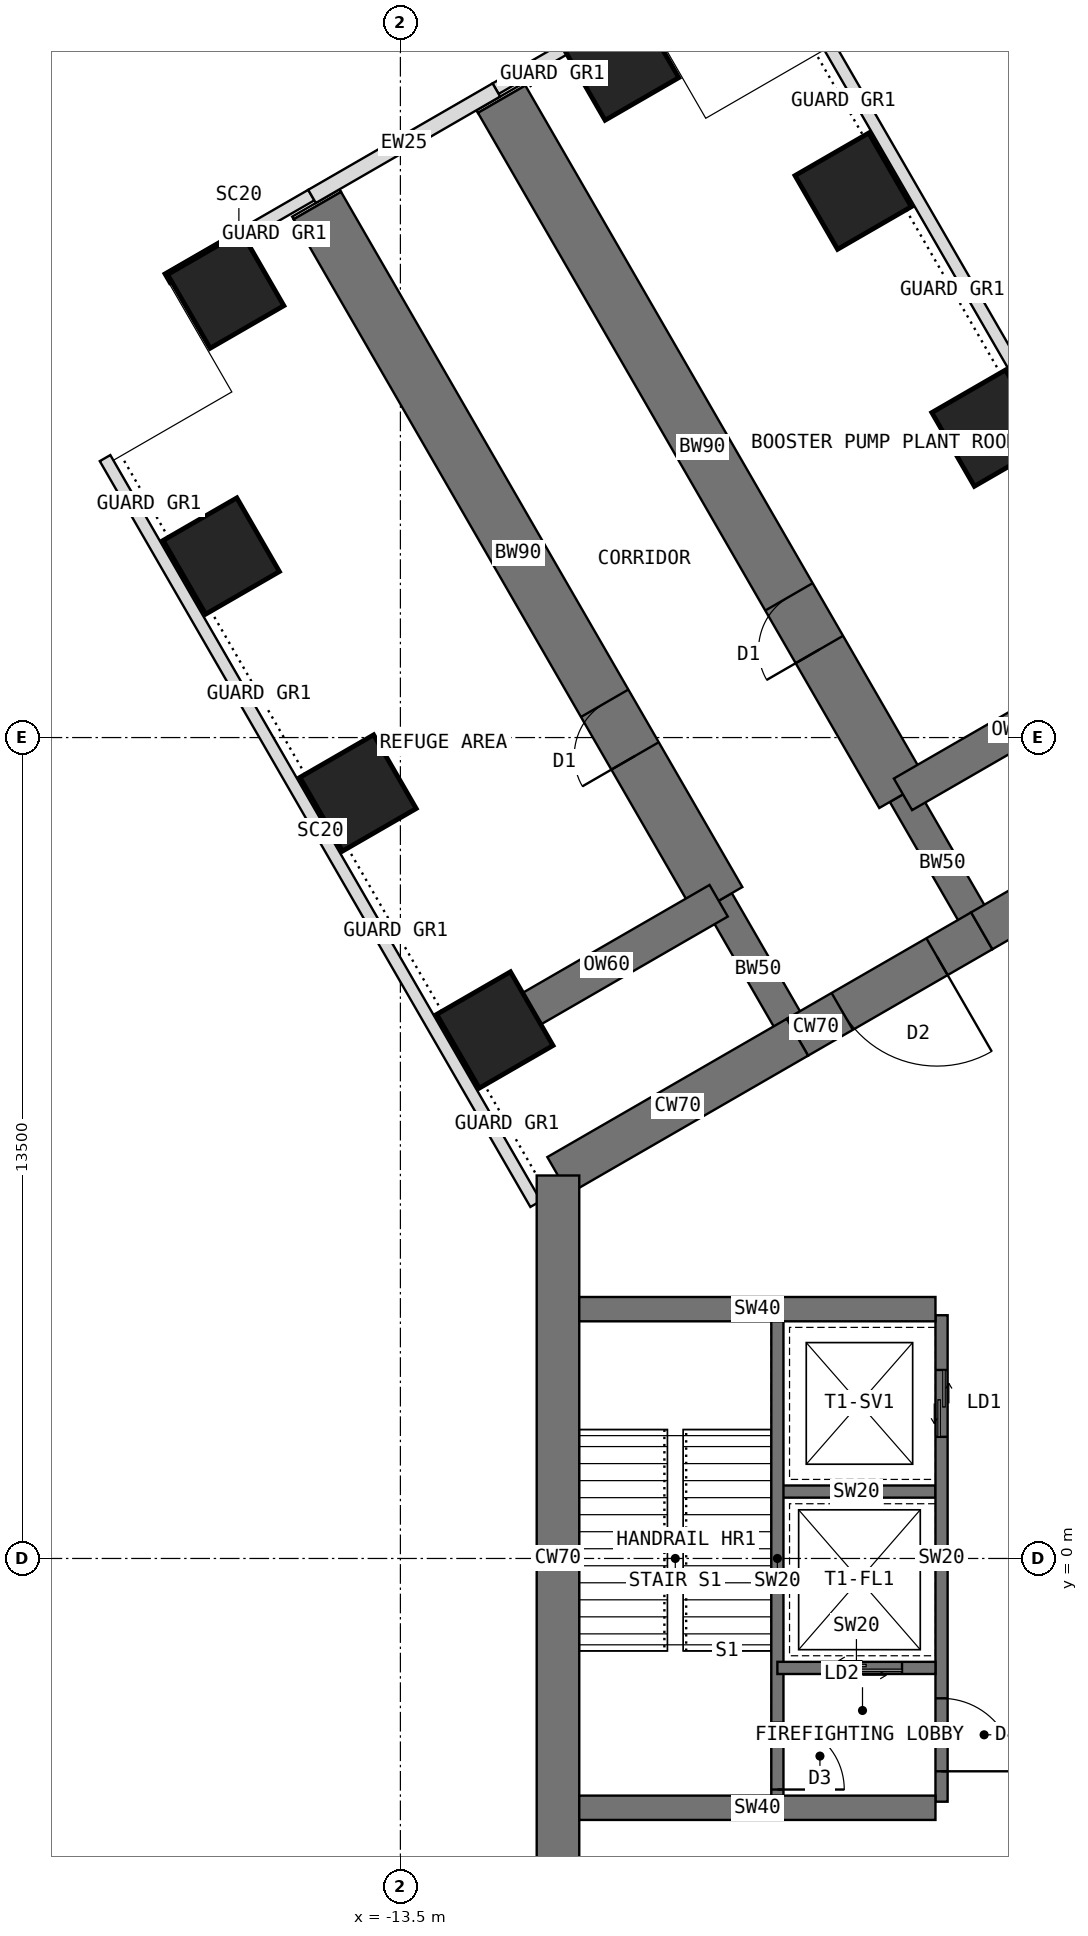
"""IFC4 building model, lengths in metres.
Left out: names, types, materials, properties, quantities, classifications, styles, units other than length and angle.
Written with IfcOpenShell. Run it as: python <this file> out.ifc"""

import sys

from ifc_helpers import new_model, si_unit, direction, frame, frame_2d, origin, origin_2d, place, context, subcontext, project, spatial, rectangle, extrude, element, fill, save


model = new_model("IFC4")
c1 = context("Model", 3, precision=1e-05, world=origin(), true_north=direction((0.0, 1.0)))
c2 = subcontext(c1, "Body", "Model", "MODEL_VIEW")
j1 = project(units=[si_unit("LENGTHUNIT", "METRE"), si_unit("PLANEANGLEUNIT", "RADIAN")], contexts=[c1])
p1 = place(None, origin())
s1 = spatial("IfcSite", under=j1, at=p1, CompositionType="ELEMENT")
p2 = place(p1, origin())
s2 = spatial("IfcBuilding", under=s1, at=p2, CompositionType="ELEMENT")
p3 = place(p2, frame((0.0, 0.0, 92.5)))
s3 = spatial("IfcBuildingStorey", under=s2, at=p3, CompositionType="ELEMENT", Elevation=92.5)
p4 = place(p3, frame((0.0, 12.596, 0.0), z_axis=(0.0, 0.0, 1.0), x_axis=(-0.866011268655, -0.500024481964, 0.0)))
e1 = element("IfcWall", 1, at=p4, inside=s3, PredefinedType="SHEAR", context=c2, shape_type="SweptSolid", body=[
    extrude(rectangle(XDim=4.548, YDim=0.7, at=frame_2d((2.274, 0.0))), origin(), (0.0, 0.0, 1.0), 5.0),
])
p5 = place(p3, frame((-3.939, 10.322, 0.0), z_axis=(0.0, 0.0, 1.0), x_axis=(-0.866019471182, -0.500010275428, 0.0)))
e2 = element("IfcWall", 2, at=p5, inside=s3, PredefinedType="SHEAR", context=c2, shape_type="SweptSolid", body=[
    extrude(rectangle(XDim=3.5, YDim=0.7, at=frame_2d((1.75, 0.0))), origin(), (0.0, 0.0, 1.0), 5.0),
])
p6 = place(p5, frame((0.85, 0.0, 0.0)))
e3 = element("IfcOpeningElement", 3, at=p6, cuts=e2, PredefinedType="OPENING", context=c2, shape_type="SweptSolid", body=[
    extrude(rectangle(XDim=1.8, YDim=2.1, at=frame_2d((0.9, 1.05))), frame((0.0, 0.36, 0.0), z_axis=(0.0, -1.0, 0.0), x_axis=(1.0, 0.0, 0.0)), (0.0, 0.0, 1.0), 0.72),
])
p7 = place(p3, frame((-6.97, 8.572, 0.0), z_axis=(0.0, 0.0, 1.0), x_axis=(-0.866034513004, -0.499984222037, 0.0)))
e4 = element("IfcWall", 4, at=p7, inside=s3, PredefinedType="SHEAR", context=c2, shape_type="SweptSolid", body=[
    extrude(rectangle(XDim=4.548, YDim=0.7, at=frame_2d((2.274, 0.0))), origin(), (0.0, 0.0, 1.0), 5.0),
])
p8 = place(p3, frame((-10.908, 6.298, 0.0), z_axis=(0.0, 0.0, 1.0), x_axis=(0.0, -1.0, 0.0)))
e5 = element("IfcWall", 5, at=p8, inside=s3, PredefinedType="SHEAR", context=c2, shape_type="SweptSolid", body=[
    extrude(rectangle(XDim=12.596, YDim=0.7, at=frame_2d((6.298, 0.0))), origin(), (0.0, 0.0, 1.0), 5.0),
])
p9 = place(p3, frame((-6.97, 8.572, 0.0), z_axis=(0.0, 0.0, 1.0), x_axis=(-0.499988811324, 0.866031863473, 0.0)))
e6 = element("IfcWall", 6, at=p9, inside=s3, PredefinedType="SHEAR", context=c2, shape_type="SweptSolid", body=[
    extrude(rectangle(XDim=2.592, YDim=0.5, at=frame_2d((1.296, 0.0))), origin(), (0.0, 0.0, 1.0), 5.0),
])
p10 = place(p3, frame((-8.266, 10.816, 0.0), z_axis=(0.0, 0.0, 1.0), x_axis=(-0.499996231654, 0.866027579429, 0.0)))
e7 = element("IfcWall", 7, at=p10, inside=s3, PredefinedType="SHEAR", context=c2, shape_type="SweptSolid", body=[
    extrude(rectangle(XDim=13.2, YDim=0.9, at=frame_2d((6.6, 0.0))), origin(), (0.0, 0.0, 1.0), 5.0),
])
p11 = place(p10, frame((2.75, 0.0, 0.0)))
e8 = element("IfcOpeningElement", 8, at=p11, cuts=e7, PredefinedType="OPENING", context=c2, shape_type="SweptSolid", body=[
    extrude(rectangle(XDim=1.0, YDim=2.1, at=frame_2d((0.5, 1.05))), frame((0.0, 0.46, 0.0), z_axis=(0.0, -1.0, 0.0), x_axis=(1.0, 0.0, 0.0)), (0.0, 0.0, 1.0), 0.92),
])
p12 = place(p3, frame((-3.939, 10.322, 0.0), z_axis=(0.0, 0.0, 1.0), x_axis=(-0.499918158782, 0.866072649678, 0.0)))
e9 = element("IfcWall", 9, at=p12, inside=s3, PredefinedType="SHEAR", context=c2, shape_type="SweptSolid", body=[
    extrude(rectangle(XDim=2.592, YDim=0.5, at=frame_2d((1.296, 0.0))), origin(), (0.0, 0.0, 1.0), 5.0),
])
p13 = place(p3, frame((-5.234, 12.566, 0.0), z_axis=(0.0, 0.0, 1.0), x_axis=(-0.500010103361, 0.866019570528, 0.0)))
e10 = element("IfcWall", 10, at=p13, inside=s3, PredefinedType="SHEAR", context=c2, shape_type="SweptSolid", body=[
    extrude(rectangle(XDim=13.2, YDim=0.9, at=frame_2d((6.6, 0.0))), origin(), (0.0, 0.0, 1.0), 5.0),
])
p14 = place(p13, frame((2.75, 0.0, 0.0)))
e11 = element("IfcOpeningElement", 11, at=p14, cuts=e10, PredefinedType="OPENING", context=c2, shape_type="SweptSolid", body=[
    extrude(rectangle(XDim=1.0, YDim=2.1, at=frame_2d((0.5, 1.05))), frame((0.0, 0.46, 0.0), z_axis=(0.0, -1.0, 0.0), x_axis=(1.0, 0.0, 0.0)), (0.0, 0.0, 1.0), 0.92),
])
for number, where, z_axis, x_axis in (
    (12, (-11.946, 8.691, 0.0), (0.0, 0.0, 1.0), (0.866, 0.5, 0.0)),
    (13, (-14.196, 12.588, 0.0), (0.0, 0.0, 1.0), (0.866, 0.5, 0.0)),
    (14, (-3.804, 18.588, 0.0), (0.0, 0.0, 1.0), (0.866, 0.5, 0.0)),
    (15, (-16.446, 16.486, 0.0), (0.0, 0.0, 1.0), (0.866, 0.5, 0.0)),
    (16, (-6.054, 22.486, 0.0), (0.0, 0.0, 1.0), (0.866, 0.5, 0.0)),
    (17, (-16.373, 20.858, 0.0), (0.0, 0.0, 1.0), (0.866, 0.5, 0.0)),
    (18, (-9.877, 24.608, 0.0), (0.0, 0.0, 1.0), (0.866, 0.5, 0.0)),
):
    element("IfcColumn", number, at=place(p3, frame(where, z_axis=z_axis, x_axis=x_axis)), inside=s3, PredefinedType="COLUMN", context=c2, shape_type="SweptSolid", body=[
        extrude(rectangle(XDim=1.4, YDim=1.4, at=origin_2d()), origin(), (0.0, 0.0, 1.0), 5.0),
    ])
for number, where, z_axis, x_axis in (
    (19, (-8.266, 10.816, 0.0), (0.0, 0.0, 1.0), (-0.866, -0.5, 0.0)),
    (20, (-5.234, 12.566, 0.0), (0.0, 0.0, 1.0), (0.866, 0.5, 0.0)),
):
    element("IfcWall", number, at=place(p3, frame(where, z_axis=z_axis, x_axis=x_axis)), inside=s3, PredefinedType="SHEAR", context=c2, shape_type="SweptSolid", body=[
        extrude(rectangle(XDim=4.25, YDim=0.6, at=frame_2d((2.125, 0.0))), origin(), (0.0, 0.0, 1.0), 5.0),
    ])
for number, where, z_axis, x_axis in (
    (21, (-11.276, 5.83, 0.0), (0.0, 0.0, 1.0), (-0.5, 0.866, 0.0)),
    (22, (-6.493, 24.946, 0.0), (0.0, 0.0, 1.0), (0.5, -0.866, 0.0)),
):
    element("IfcWall", number, at=place(p3, frame(where, z_axis=z_axis, x_axis=x_axis)), inside=s3, PredefinedType="USERDEFINED", context=c2, shape_type="SweptSolid", body=[
        extrude(rectangle(XDim=14.163, YDim=0.2, at=frame_2d((7.082, 0.0))), origin(), (0.0, 0.0, 1.0), 4.8),
    ])
p15 = place(p3, frame((-9.553, 25.546, 0.0), z_axis=(0.0, 0.0, 1.0), x_axis=(-0.866027397988, -0.499996545922, 0.0)))
e23 = element("IfcWall", 23, at=p15, inside=s3, PredefinedType="USERDEFINED", context=c2, shape_type="SweptSolid", body=[
    extrude(rectangle(XDim=2.75, YDim=0.2, at=frame_2d((1.375, 0.0))), origin(), (0.0, 0.0, 1.0), 4.8),
])
p16 = place(p3, frame((-11.922, 24.149, 0.0), z_axis=(0.0, 0.0, 1.0), x_axis=(-0.866036909293, -0.499980071345, 0.0)))
e24 = element("IfcWall", 24, at=p16, inside=s3, PredefinedType="STANDARD", context=c2, shape_type="SweptSolid", body=[
    extrude(rectangle(XDim=3.5, YDim=0.25, at=frame_2d((1.75, 0.0))), origin(), (0.0, 0.0, 1.0), 4.8),
])
p17 = place(p3, frame((-14.966, 22.421, 0.0), z_axis=(0.0, 0.0, 1.0), x_axis=(-0.866027397988, -0.499996545922, 0.0)))
e25 = element("IfcWall", 25, at=p17, inside=s3, PredefinedType="USERDEFINED", context=c2, shape_type="SweptSolid", body=[
    extrude(rectangle(XDim=2.75, YDim=0.2, at=frame_2d((1.375, 0.0))), origin(), (0.0, 0.0, 1.0), 4.8),
])
p18 = place(p3, frame((-14.865, 22.248, 0.0), z_axis=(0.0, 0.0, 1.0), x_axis=(-0.500844580232, 0.86553723574, 0.0)))
e26 = element("IfcWall", 26, at=p18, inside=s3, PredefinedType="PARTITIONING", context=c2, shape_type="SweptSolid", body=[
    extrude(rectangle(XDim=0.05, YDim=0.9, at=frame_2d((0.025, 0.0))), origin(), (0.0, 0.0, 1.0), 4.8),
])
p19 = place(p3, frame((-11.834, 23.998, 0.0), z_axis=(0.0, 0.0, 1.0), x_axis=(-0.497188445666, 0.867642581652, 0.0)))
e27 = element("IfcWall", 27, at=p19, inside=s3, PredefinedType="PARTITIONING", context=c2, shape_type="SweptSolid", body=[
    extrude(rectangle(XDim=0.05, YDim=0.9, at=frame_2d((0.025, 0.0))), origin(), (0.0, 0.0, 1.0), 4.8),
])
p20 = place(p3, frame((-4.6, 4.0, 0.0), z_axis=(0.0, 0.0, 1.0), x_axis=(0.0, -1.0, 0.0)))
e28 = element("IfcWall", 28, at=p20, inside=s3, PredefinedType="SHEAR", context=c2, shape_type="SweptSolid", body=[
    extrude(rectangle(XDim=8.0, YDim=0.2, at=frame_2d((4.0, 0.0))), origin(), (0.0, 0.0, 1.0), 5.0),
])
p21 = place(p20, frame((6.3, 0.0, 0.0)))
e29 = element("IfcOpeningElement", 29, at=p21, cuts=e28, PredefinedType="OPENING", context=c2, shape_type="SweptSolid", body=[
    extrude(rectangle(XDim=1.2, YDim=2.1, at=frame_2d((0.6, 1.05))), frame((0.0, 0.11, 0.0), z_axis=(0.0, -1.0, 0.0), x_axis=(1.0, 0.0, 0.0)), (0.0, 0.0, 1.0), 0.22),
])
p22 = place(p20, frame((0.9, 0.0, 0.0)))
e30 = element("IfcOpeningElement", 30, at=p22, cuts=e28, PredefinedType="OPENING", context=c2, shape_type="SweptSolid", body=[
    extrude(rectangle(XDim=1.1, YDim=2.2, at=frame_2d((0.55, 1.1))), frame((0.0, 0.11, 0.0), z_axis=(0.0, -1.0, 0.0), x_axis=(1.0, 0.0, 0.0)), (0.0, 0.0, 1.0), 0.22),
])
p23 = place(p3, frame((-4.7, 1.1, 0.0), z_axis=(0.0, 0.0, 1.0), x_axis=(-1.0, 0.0, 0.0)))
e31 = element("IfcWall", 31, at=p23, inside=s3, PredefinedType="SHEAR", context=c2, shape_type="SweptSolid", body=[
    extrude(rectangle(XDim=2.6, YDim=0.2, at=frame_2d((1.3, 0.0))), origin(), (0.0, 0.0, 1.0), 5.0),
])
p24 = place(p3, frame((-4.7, -1.8, 0.0), z_axis=(0.0, 0.0, 1.0), x_axis=(-1.0, 0.0, 0.0)))
e32 = element("IfcWall", 32, at=p24, inside=s3, PredefinedType="SHEAR", context=c2, shape_type="SweptSolid", body=[
    extrude(rectangle(XDim=2.6, YDim=0.2, at=frame_2d((1.3, 0.0))), origin(), (0.0, 0.0, 1.0), 5.0),
])
p25 = place(p24, frame((0.55, 0.0, 0.0)))
e33 = element("IfcOpeningElement", 33, at=p25, cuts=e32, PredefinedType="OPENING", context=c2, shape_type="SweptSolid", body=[
    extrude(rectangle(XDim=1.3, YDim=2.2, at=frame_2d((0.65, 1.1))), frame((0.0, 0.11, 0.0), z_axis=(0.0, -1.0, 0.0), x_axis=(1.0, 0.0, 0.0)), (0.0, 0.0, 1.0), 0.22),
])
p26 = place(p3, frame((-7.3, 4.0, 0.0), z_axis=(0.0, 0.0, 1.0), x_axis=(0.0, -1.0, 0.0)))
e34 = element("IfcWall", 34, at=p26, inside=s3, PredefinedType="SHEAR", context=c2, shape_type="SweptSolid", body=[
    extrude(rectangle(XDim=8.0, YDim=0.2, at=frame_2d((4.0, 0.0))), origin(), (0.0, 0.0, 1.0), 5.0),
])
p27 = place(p26, frame((6.7, 0.0, 0.0)))
e35 = element("IfcOpeningElement", 35, at=p27, cuts=e34, PredefinedType="OPENING", context=c2, shape_type="SweptSolid", body=[
    extrude(rectangle(XDim=1.1, YDim=2.1, at=frame_2d((0.55, 1.05))), frame((0.0, 0.11, 0.0), z_axis=(0.0, -1.0, 0.0), x_axis=(1.0, 0.0, 0.0)), (0.0, 0.0, 1.0), 0.22),
])
for number, where, z_axis, x_axis in (
    (36, (-4.7, -4.1, 0.0), (0.0, 0.0, 1.0), (-1.0, 0.0, 0.0)),
    (37, (-4.7, 4.1, 0.0), (0.0, 0.0, 1.0), (-1.0, 0.0, 0.0)),
):
    element("IfcWall", number, at=place(p3, frame(where, z_axis=z_axis, x_axis=x_axis)), inside=s3, PredefinedType="SHEAR", context=c2, shape_type="SweptSolid", body=[
        extrude(rectangle(XDim=5.858, YDim=0.4, at=frame_2d((2.929, 0.0))), origin(), (0.0, 0.0, 1.0), 5.0),
    ])
p28 = place(p21, origin())
e38 = element("IfcDoor", 38, at=p28, inside=s3, OperationType="SINGLE_SWING_RIGHT", PredefinedType="DOOR", context=c2, shape_type="SweptSolid", body=[
    extrude(rectangle(XDim=1.2, YDim=2.1, at=frame_2d((0.6, 1.05))), frame((0.0, 0.025, 0.0), z_axis=(0.0, -1.0, 0.0), x_axis=(1.0, 0.0, 0.0)), (0.0, 0.0, 1.0), 0.05),
])
fill(e29, e38)
p29 = place(p25, origin())
e39 = element("IfcDoor", 39, at=p29, inside=s3, OperationType="DOUBLE_DOOR_SLIDING", PredefinedType="DOOR", context=c2, shape_type="SweptSolid", body=[
    extrude(rectangle(XDim=1.3, YDim=2.2, at=frame_2d((0.65, 1.1))), frame((0.0, 0.025, 0.0), z_axis=(0.0, -1.0, 0.0), x_axis=(1.0, 0.0, 0.0)), (0.0, 0.0, 1.0), 0.05),
])
fill(e33, e39)
p30 = place(p22, origin())
e40 = element("IfcDoor", 40, at=p30, inside=s3, OperationType="DOUBLE_DOOR_SLIDING", PredefinedType="DOOR", context=c2, shape_type="SweptSolid", body=[
    extrude(rectangle(XDim=1.1, YDim=2.2, at=frame_2d((0.55, 1.1))), frame((0.0, 0.025, 0.0), z_axis=(0.0, -1.0, 0.0), x_axis=(1.0, 0.0, 0.0)), (0.0, 0.0, 1.0), 0.05),
])
fill(e30, e40)
p31 = place(p27, origin())
e41 = element("IfcDoor", 41, at=p31, inside=s3, OperationType="SINGLE_SWING_RIGHT", PredefinedType="DOOR", context=c2, shape_type="SweptSolid", body=[
    extrude(rectangle(XDim=1.1, YDim=2.1, at=frame_2d((0.55, 1.05))), frame((0.0, 0.025, 0.0), z_axis=(0.0, -1.0, 0.0), x_axis=(1.0, 0.0, 0.0)), (0.0, 0.0, 1.0), 0.05),
])
fill(e35, e41)
p32 = place(p6, origin())
e42 = element("IfcDoor", 42, at=p32, inside=s3, OperationType="DOUBLE_DOOR_DOUBLE_SWING", PredefinedType="DOOR", context=c2, shape_type="SweptSolid", body=[
    extrude(rectangle(XDim=1.72, YDim=2.06, at=frame_2d((0.9, 1.03))), frame((0.0, 0.025, 0.0), z_axis=(0.0, -1.0, 0.0), x_axis=(1.0, 0.0, 0.0)), (0.0, 0.0, 1.0), 0.05),
    extrude(rectangle(XDim=0.04, YDim=2.1, at=frame_2d((0.02, 1.05))), frame((0.0, 0.35, 0.0), z_axis=(0.0, -1.0, 0.0), x_axis=(1.0, 0.0, 0.0)), (0.0, 0.0, 1.0), 0.699),
    extrude(rectangle(XDim=0.04, YDim=2.1, at=frame_2d((1.78, 1.05))), frame((0.0, 0.35, 0.0), z_axis=(0.0, -1.0, 0.0), x_axis=(1.0, 0.0, 0.0)), (0.0, 0.0, 1.0), 0.699),
    extrude(rectangle(XDim=1.72, YDim=0.04, at=frame_2d((0.9, 2.08))), frame((0.0, 0.35, 0.0), z_axis=(0.0, -1.0, 0.0), x_axis=(1.0, 0.0, 0.0)), (0.0, 0.0, 1.0), 0.699),
])
fill(e3, e42)
p33 = place(p11, origin())
e43 = element("IfcDoor", 43, at=p33, inside=s3, OperationType="SINGLE_SWING_LEFT", PredefinedType="DOOR", context=c2, shape_type="SweptSolid", body=[
    extrude(rectangle(XDim=0.92, YDim=2.06, at=frame_2d((0.5, 1.03))), frame((0.0, 0.025, 0.0), z_axis=(0.0, -1.0, 0.0), x_axis=(1.0, 0.0, 0.0)), (0.0, 0.0, 1.0), 0.05),
    extrude(rectangle(XDim=0.04, YDim=2.1, at=frame_2d((0.02, 1.05))), frame((0.0, 0.45, 0.0), z_axis=(0.0, -1.0, 0.0), x_axis=(1.0, 0.0, 0.0)), (0.0, 0.0, 1.0), 0.899),
    extrude(rectangle(XDim=0.04, YDim=2.1, at=frame_2d((0.98, 1.05))), frame((0.0, 0.45, 0.0), z_axis=(0.0, -1.0, 0.0), x_axis=(1.0, 0.0, 0.0)), (0.0, 0.0, 1.0), 0.899),
    extrude(rectangle(XDim=0.92, YDim=0.04, at=frame_2d((0.5, 2.08))), frame((0.0, 0.45, 0.0), z_axis=(0.0, -1.0, 0.0), x_axis=(1.0, 0.0, 0.0)), (0.0, 0.0, 1.0), 0.899),
])
fill(e8, e43)
p34 = place(p14, origin())
e44 = element("IfcDoor", 44, at=p34, inside=s3, OperationType="SINGLE_SWING_LEFT", PredefinedType="DOOR", context=c2, shape_type="SweptSolid", body=[
    extrude(rectangle(XDim=0.92, YDim=2.06, at=frame_2d((0.5, 1.03))), frame((0.0, 0.025, 0.0), z_axis=(0.0, -1.0, 0.0), x_axis=(1.0, 0.0, 0.0)), (0.0, 0.0, 1.0), 0.05),
    extrude(rectangle(XDim=0.04, YDim=2.1, at=frame_2d((0.02, 1.05))), frame((0.0, 0.45, 0.0), z_axis=(0.0, -1.0, 0.0), x_axis=(1.0, 0.0, 0.0)), (0.0, 0.0, 1.0), 0.899),
    extrude(rectangle(XDim=0.04, YDim=2.1, at=frame_2d((0.98, 1.05))), frame((0.0, 0.45, 0.0), z_axis=(0.0, -1.0, 0.0), x_axis=(1.0, 0.0, 0.0)), (0.0, 0.0, 1.0), 0.899),
    extrude(rectangle(XDim=0.92, YDim=0.04, at=frame_2d((0.5, 2.08))), frame((0.0, 0.45, 0.0), z_axis=(0.0, -1.0, 0.0), x_axis=(1.0, 0.0, 0.0)), (0.0, 0.0, 1.0), 0.899),
])
fill(e11, e44)
save(model, sys.argv[1])
